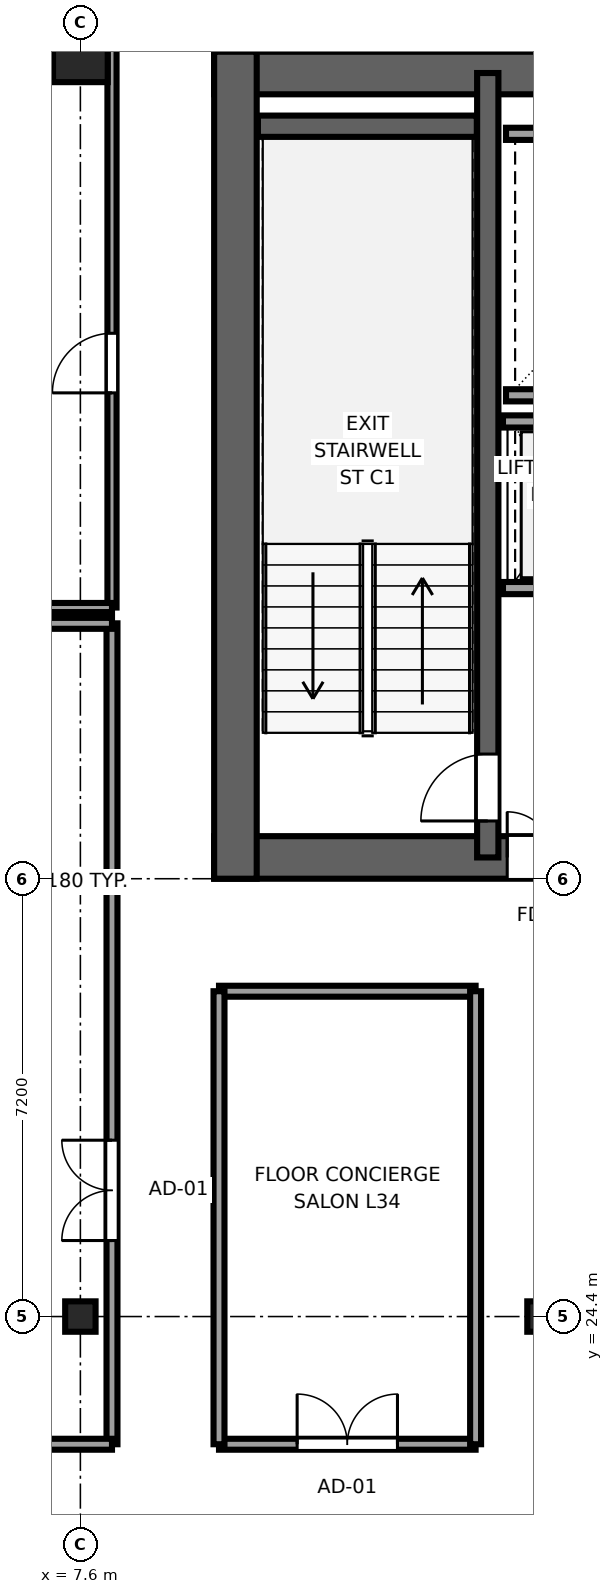
"""IFC4 building model, lengths in metres.
Left out: names, types, materials, properties, quantities, classifications, styles, units other than length and angle.
Written with IfcOpenShell. Run it as: python <this file> out.ifc"""

import sys

from ifc_helpers import new_model, si_unit, direction, frame, frame_2d, origin, origin_2d, place, context, subcontext, project, spatial, rectangle, i_section, extrude, source, transform, mapped, element, fill, save


model = new_model("IFC4")
c1 = context("Model", 3, precision=1e-05, world=origin(), true_north=direction((0.0, 1.0)))
c2 = subcontext(c1, "Body", "Model", "MODEL_VIEW")
j1 = project(units=[si_unit("LENGTHUNIT", "METRE"), si_unit("PLANEANGLEUNIT", "RADIAN")], contexts=[c1])
p1 = place(None, origin())
s1 = spatial("IfcSite", under=j1, at=p1, CompositionType="ELEMENT")
p2 = place(p1, origin())
s2 = spatial("IfcBuilding", under=s1, at=p2, CompositionType="ELEMENT")
p3 = place(p2, frame((0.0, 0.0, 132.85)))
s3 = spatial("IfcBuildingStorey", under=s2, at=p3, CompositionType="ELEMENT", Elevation=132.85)
p4 = place(p3, frame((9.8, 31.95, 0.0), z_axis=(0.0, 0.0, 1.0), x_axis=(1.0, 0.0, 0.0)))
e1 = element("IfcWall", 1, at=p4, inside=s3, PredefinedType="SHEAR", context=c2, shape_type="SweptSolid", body=[
    extrude(rectangle(XDim=26.4, YDim=0.7, at=frame_2d((13.2, 0.0))), origin(), (0.0, 0.0, 1.0), 3.55),
])
p5 = place(p4, frame((6.32, 0.0, 0.0), z_axis=(0.0, 0.0, 1.0), x_axis=(-1.0, 0.0, 0.0)))
e2 = element("IfcOpeningElement", 2, at=p5, cuts=e1, PredefinedType="OPENING", context=c2, shape_type="SweptSolid", body=[
    extrude(rectangle(XDim=1.5, YDim=2.04, at=frame_2d((0.75, 1.02))), frame((0.0, 0.36, 0.0), z_axis=(0.0, -1.0, 0.0), x_axis=(1.0, 0.0, 0.0)), (0.0, 0.0, 1.0), 0.72),
])
p6 = place(p4, frame((13.95, 0.0, 0.0), z_axis=(0.0, 0.0, 1.0), x_axis=(-1.0, 0.0, 0.0)))
e3 = element("IfcOpeningElement", 3, at=p6, cuts=e1, PredefinedType="OPENING", context=c2, shape_type="SweptSolid", body=[
    extrude(rectangle(XDim=1.5, YDim=2.04, at=frame_2d((0.75, 1.02))), frame((0.0, 0.36, 0.0), z_axis=(0.0, -1.0, 0.0), x_axis=(1.0, 0.0, 0.0)), (0.0, 0.0, 1.0), 0.72),
])
p7 = place(p4, frame((20.25, 0.0, 0.0), z_axis=(0.0, 0.0, 1.0), x_axis=(-1.0, 0.0, 0.0)))
e4 = element("IfcOpeningElement", 4, at=p7, cuts=e1, PredefinedType="OPENING", context=c2, shape_type="SweptSolid", body=[
    extrude(rectangle(XDim=1.5, YDim=2.04, at=frame_2d((0.75, 1.02))), frame((0.0, 0.36, 0.0), z_axis=(0.0, -1.0, 0.0), x_axis=(1.0, 0.0, 0.0)), (0.0, 0.0, 1.0), 0.72),
])
p8 = place(p4, frame((8.37, 0.0, 0.0), z_axis=(0.0, 0.0, 1.0), x_axis=(-1.0, 0.0, 0.0)))
e5 = element("IfcOpeningElement", 5, at=p8, cuts=e1, PredefinedType="OPENING", context=c2, shape_type="SweptSolid", body=[
    extrude(rectangle(XDim=0.82, YDim=2.01, at=frame_2d((0.41, 1.005))), frame((0.0, 0.36, 0.0), z_axis=(0.0, -1.0, 0.0), x_axis=(1.0, 0.0, 0.0)), (0.0, 0.0, 1.0), 0.72),
])
p9 = place(p3, frame((9.8, 44.85, 0.0), z_axis=(0.0, 0.0, 1.0), x_axis=(1.0, 0.0, 0.0)))
e6 = element("IfcWall", 6, at=p9, inside=s3, PredefinedType="SHEAR", context=c2, shape_type="SweptSolid", body=[
    extrude(rectangle(XDim=26.4, YDim=0.7, at=frame_2d((13.2, 0.0))), origin(), (0.0, 0.0, 1.0), 3.55),
])
p10 = place(p3, frame((10.15, 31.6, 0.0), z_axis=(0.0, 0.0, 1.0), x_axis=(0.0, 1.0, 0.0)))
e7 = element("IfcWall", 7, at=p10, inside=s3, PredefinedType="SHEAR", context=c2, shape_type="SweptSolid", body=[
    extrude(rectangle(XDim=13.6, YDim=0.7, at=frame_2d((6.8, 0.0))), origin(), (0.0, 0.0, 1.0), 3.55),
])
p11 = place(p3, frame((14.3, 31.95, 0.0), z_axis=(0.0, 0.0, 1.0), x_axis=(0.0, 1.0, 0.0)))
e8 = element("IfcWall", 8, at=p11, inside=s3, PredefinedType="SHEAR", context=c2, shape_type="SweptSolid", body=[
    extrude(rectangle(XDim=12.9, YDim=0.35, at=frame_2d((6.45, 0.0))), origin(), (0.0, 0.0, 1.0), 3.55),
])
p12 = place(p11, frame((0.6, 0.0, 0.0)))
e9 = element("IfcOpeningElement", 9, at=p12, cuts=e8, PredefinedType="OPENING", context=c2, shape_type="SweptSolid", body=[
    extrude(rectangle(XDim=1.1, YDim=2.12, at=frame_2d((0.55, 1.06))), frame((0.0, 0.185, 0.0), z_axis=(0.0, -1.0, 0.0), x_axis=(1.0, 0.0, 0.0)), (0.0, 0.0, 1.0), 0.37),
])
p13 = place(p3, frame((10.52, 43.975, 0.0), z_axis=(0.0, 0.0, 1.0), x_axis=(1.0, 0.0, 0.0)))
e10 = element("IfcWall", 10, at=p13, inside=s3, PredefinedType="SHEAR", context=c2, shape_type="SweptSolid", body=[
    extrude(rectangle(XDim=3.6, YDim=0.35, at=frame_2d((1.8, 0.0))), origin(), (0.0, 0.0, 1.0), 3.55),
])
m1 = source(origin(), c2, "Body", "SweptSolid", [
    extrude(i_section(OverallWidth=0.5, OverallDepth=0.5, WebThickness=0.022, FlangeThickness=0.034, at=origin_2d()), origin(), (0.0, 0.0, 1.0), 3.55),
])
for number, where, z_axis, x_axis in (
    (11, (7.6, 24.4, 0.0), (0.0, 0.0, 1.0), (1.0, 0.0, 0.0)),
    (12, (15.2, 24.4, 0.0), (0.0, 0.0, 1.0), (1.0, 0.0, 0.0)),
):
    element("IfcColumn", number, at=place(p3, frame(where, z_axis=z_axis, x_axis=x_axis)), inside=s3, PredefinedType="COLUMN", context=c2, shape_type="MappedRepresentation", body=[
        mapped(m1, transform((0.0, 0.0, 0.0), x_axis=(1.0, 0.0, 0.0), y_axis=(0.0, 1.0, 0.0), z_axis=(0.0, 0.0, 1.0), scale=1.0)),
    ])
m2 = source(origin(), c2, "Body", "SweptSolid", [
    extrude(rectangle(XDim=0.9, YDim=0.9, at=origin_2d()), origin(), (0.0, 0.0, 1.0), 3.55),
])
p14 = place(p3, frame((7.6, 45.15, 0.0), z_axis=(0.0, 0.0, 1.0), x_axis=(1.0, 0.0, 0.0)))
e13 = element("IfcColumn", 13, at=p14, inside=s3, PredefinedType="COLUMN", context=c2, shape_type="MappedRepresentation", body=[
    mapped(m2, transform((0.0, 0.0, 0.0), x_axis=(1.0, 0.0, 0.0), y_axis=(0.0, 1.0, 0.0), z_axis=(0.0, 0.0, 1.0), scale=1.0)),
])
for number, where, z_axis, x_axis in (
    (14, (14.6, 39.55, 0.0), (0.0, 0.0, 1.0), (1.0, 0.0, 0.0)),
    (15, (14.6, 43.85, 0.0), (0.0, 0.0, 1.0), (1.0, 0.0, 0.0)),
):
    element("IfcWall", number, at=place(p3, frame(where, z_axis=z_axis, x_axis=x_axis)), inside=s3, PredefinedType="SOLIDWALL", context=c2, shape_type="SweptSolid", body=[
        extrude(rectangle(XDim=4.1, YDim=0.2, at=frame_2d((2.05, 0.0))), origin(), (0.0, 0.0, 1.0), 3.37),
    ])
p15 = place(p3, frame((14.55, 36.38, 0.0), z_axis=(0.0, 0.0, 1.0), x_axis=(1.0, 0.0, 0.0)))
e16 = element("IfcWall", 16, at=p15, inside=s3, PredefinedType="SOLIDWALL", context=c2, shape_type="SweptSolid", body=[
    extrude(rectangle(XDim=4.075, YDim=0.2, at=frame_2d((2.038, 0.0))), origin(), (0.0, 0.0, 1.0), 3.37),
])
p16 = place(p15, frame((0.55, 0.0, 0.0)))
e17 = element("IfcOpeningElement", 17, at=p16, cuts=e16, PredefinedType="OPENING", context=c2, shape_type="SweptSolid", body=[
    extrude(rectangle(XDim=1.1, YDim=2.12, at=frame_2d((0.55, 1.06))), frame((0.0, 0.11, 0.0), z_axis=(0.0, -1.0, 0.0), x_axis=(1.0, 0.0, 0.0)), (0.0, 0.0, 1.0), 0.22),
])
p17 = place(p15, frame((2.45, 0.0, 0.0)))
e18 = element("IfcOpeningElement", 18, at=p17, cuts=e16, PredefinedType="OPENING", context=c2, shape_type="SweptSolid", body=[
    extrude(rectangle(XDim=1.1, YDim=2.12, at=frame_2d((0.55, 1.06))), frame((0.0, 0.11, 0.0), z_axis=(0.0, -1.0, 0.0), x_axis=(1.0, 0.0, 0.0)), (0.0, 0.0, 1.0), 0.22),
])
p18 = place(p3, frame((14.55, 39.12, 0.0), z_axis=(0.0, 0.0, 1.0), x_axis=(1.0, 0.0, 0.0)))
e19 = element("IfcWall", 19, at=p18, inside=s3, PredefinedType="SOLIDWALL", context=c2, shape_type="SweptSolid", body=[
    extrude(rectangle(XDim=4.075, YDim=0.2, at=frame_2d((2.038, 0.0))), origin(), (0.0, 0.0, 1.0), 3.37),
])
p19 = place(p3, frame((8.12, 22.3, 0.0), z_axis=(0.0, 0.0, 1.0), x_axis=(0.0, 1.0, 0.0)))
e20 = element("IfcWall", 20, at=p19, inside=s3, PredefinedType="PARTITIONING", context=c2, shape_type="SweptSolid", body=[
    extrude(rectangle(XDim=13.5, YDim=0.18, at=frame_2d((6.75, 0.0))), origin(), (0.0, 0.0, 1.0), 3.37),
])
p20 = place(p19, frame((3.35, 0.0, 0.0)))
e21 = element("IfcOpeningElement", 21, at=p20, cuts=e20, PredefinedType="OPENING", context=c2, shape_type="SweptSolid", body=[
    extrude(rectangle(XDim=1.65, YDim=2.15, at=frame_2d((0.825, 1.075))), frame((0.0, 0.1, 0.0), z_axis=(0.0, -1.0, 0.0), x_axis=(1.0, 0.0, 0.0)), (0.0, 0.0, 1.0), 0.2),
])
for number, where, z_axis, x_axis in (
    (22, (0.405, 22.3, 0.0), (0.0, 0.0, 1.0), (1.0, 0.0, 0.0)),
    (23, (0.405, 35.8, 0.0), (0.0, 0.0, 1.0), (1.0, 0.0, 0.0)),
):
    element("IfcWall", number, at=place(p3, frame(where, z_axis=z_axis, x_axis=x_axis)), inside=s3, PredefinedType="PARTITIONING", context=c2, shape_type="SweptSolid", body=[
        extrude(rectangle(XDim=7.715, YDim=0.18, at=frame_2d((3.857, 0.0))), origin(), (0.0, 0.0, 1.0), 3.37),
    ])
p21 = place(p3, frame((8.12, 36.06, 0.0), z_axis=(0.0, 0.0, 1.0), x_axis=(0.0, 1.0, 0.0)))
e24 = element("IfcWall", 24, at=p21, inside=s3, PredefinedType="PARTITIONING", context=c2, shape_type="SweptSolid", body=[
    extrude(rectangle(XDim=9.535, YDim=0.15, at=frame_2d((4.768, 0.0))), origin(), (0.0, 0.0, 1.0), 3.37),
])
p22 = place(p21, frame((3.53, 0.0, 0.0)))
e25 = element("IfcOpeningElement", 25, at=p22, cuts=e24, PredefinedType="OPENING", context=c2, shape_type="SweptSolid", body=[
    extrude(rectangle(XDim=0.98, YDim=2.12, at=frame_2d((0.49, 1.06))), frame((0.0, 0.085, 0.0), z_axis=(0.0, -1.0, 0.0), x_axis=(1.0, 0.0, 0.0)), (0.0, 0.0, 1.0), 0.17),
])
p23 = place(p3, frame((2.77, 36.06, 0.0), z_axis=(0.0, 0.0, 1.0), x_axis=(1.0, 0.0, 0.0)))
e26 = element("IfcWall", 26, at=p23, inside=s3, PredefinedType="PARTITIONING", context=c2, shape_type="SweptSolid", body=[
    extrude(rectangle(XDim=5.35, YDim=0.15, at=frame_2d((2.675, 0.0))), origin(), (0.0, 0.0, 1.0), 3.37),
])
p24 = place(p3, frame((9.88, 22.3, 0.0), z_axis=(0.0, 0.0, 1.0), x_axis=(1.0, 0.0, 0.0)))
e27 = element("IfcWall", 27, at=p24, inside=s3, PredefinedType="PARTITIONING", context=c2, shape_type="SweptSolid", body=[
    extrude(rectangle(XDim=4.22, YDim=0.18, at=frame_2d((2.11, 0.0))), origin(), (0.0, 0.0, 1.0), 3.37),
])
p25 = place(p24, frame((1.285, 0.0, 0.0)))
e28 = element("IfcOpeningElement", 28, at=p25, cuts=e27, PredefinedType="OPENING", context=c2, shape_type="SweptSolid", body=[
    extrude(rectangle(XDim=1.65, YDim=2.15, at=frame_2d((0.825, 1.075))), frame((0.0, 0.1, 0.0), z_axis=(0.0, -1.0, 0.0), x_axis=(1.0, 0.0, 0.0)), (0.0, 0.0, 1.0), 0.2),
])
p26 = place(p3, frame((9.88, 29.75, 0.0), z_axis=(0.0, 0.0, 1.0), x_axis=(1.0, 0.0, 0.0)))
e29 = element("IfcWall", 29, at=p26, inside=s3, PredefinedType="PARTITIONING", context=c2, shape_type="SweptSolid", body=[
    extrude(rectangle(XDim=4.22, YDim=0.18, at=frame_2d((2.11, 0.0))), origin(), (0.0, 0.0, 1.0), 3.37),
])
for number, where, z_axis, x_axis in (
    (30, (9.88, 22.3, 0.0), (0.0, 0.0, 1.0), (0.0, 1.0, 0.0)),
    (31, (14.1, 22.3, 0.0), (0.0, 0.0, 1.0), (0.0, 1.0, 0.0)),
):
    element("IfcWall", number, at=place(p3, frame(where, z_axis=z_axis, x_axis=x_axis)), inside=s3, PredefinedType="PARTITIONING", context=c2, shape_type="SweptSolid", body=[
        extrude(rectangle(XDim=7.45, YDim=0.18, at=frame_2d((3.725, 0.0))), origin(), (0.0, 0.0, 1.0), 3.37),
    ])
m3 = source(origin(), c2, "Body", "SweptSolid", [
    extrude(rectangle(XDim=1.1, YDim=2.12, at=frame_2d((0.55, 1.06))), frame((0.0, 0.025, 0.0), z_axis=(0.0, -1.0, 0.0), x_axis=(1.0, 0.0, 0.0)), (0.0, 0.0, 1.0), 0.05),
])
p27 = place(p12, origin())
e32 = element("IfcDoor", 32, at=p27, inside=s3, OperationType="SINGLE_SWING_LEFT", PredefinedType="DOOR", context=c2, shape_type="MappedRepresentation", body=[
    mapped(m3, transform((0.0, 0.0, 0.0), x_axis=(1.0, 0.0, 0.0), y_axis=(0.0, 1.0, 0.0), z_axis=(0.0, 0.0, 1.0), scale=1.0)),
])
fill(e9, e32)
m4 = source(origin(), c2, "Body", "SweptSolid", [
    extrude(rectangle(XDim=1.5, YDim=2.04, at=frame_2d((0.75, 1.02))), frame((0.0, 0.025, 0.0), z_axis=(0.0, -1.0, 0.0), x_axis=(1.0, 0.0, 0.0)), (0.0, 0.0, 1.0), 0.05),
])
p28 = place(p5, origin())
e33 = element("IfcDoor", 33, at=p28, inside=s3, OperationType="DOUBLE_DOOR_SINGLE_SWING", PredefinedType="DOOR", context=c2, shape_type="MappedRepresentation", body=[
    mapped(m4, transform((0.0, 0.0, 0.0), x_axis=(1.0, 0.0, 0.0), y_axis=(0.0, 1.0, 0.0), z_axis=(0.0, 0.0, 1.0), scale=1.0)),
])
fill(e2, e33)
m5 = source(origin(), c2, "Body", "SweptSolid", [
    extrude(rectangle(XDim=1.65, YDim=2.15, at=frame_2d((0.825, 1.075))), frame((0.0, 0.025, 0.0), z_axis=(0.0, -1.0, 0.0), x_axis=(1.0, 0.0, 0.0)), (0.0, 0.0, 1.0), 0.05),
])
p29 = place(p20, origin())
e34 = element("IfcDoor", 34, at=p29, inside=s3, OperationType="DOUBLE_DOOR_SINGLE_SWING", PredefinedType="DOOR", context=c2, shape_type="MappedRepresentation", body=[
    mapped(m5, transform((0.0, 0.0, 0.0), x_axis=(1.0, 0.0, 0.0), y_axis=(0.0, 1.0, 0.0), z_axis=(0.0, 0.0, 1.0), scale=1.0)),
])
fill(e21, e34)
m6 = source(origin(), c2, "Body", "SweptSolid", [
    extrude(rectangle(XDim=0.98, YDim=2.12, at=frame_2d((0.49, 1.06))), frame((0.0, 0.025, 0.0), z_axis=(0.0, -1.0, 0.0), x_axis=(1.0, 0.0, 0.0)), (0.0, 0.0, 1.0), 0.05),
])
p30 = place(p22, origin())
e35 = element("IfcDoor", 35, at=p30, inside=s3, OperationType="SINGLE_SWING_LEFT", PredefinedType="DOOR", context=c2, shape_type="MappedRepresentation", body=[
    mapped(m6, transform((0.0, 0.0, 0.0), x_axis=(1.0, 0.0, 0.0), y_axis=(0.0, 1.0, 0.0), z_axis=(0.0, 0.0, 1.0), scale=1.0)),
])
fill(e25, e35)
p31 = place(p25, origin())
e36 = element("IfcDoor", 36, at=p31, inside=s3, OperationType="DOUBLE_DOOR_SINGLE_SWING", PredefinedType="DOOR", context=c2, shape_type="MappedRepresentation", body=[
    mapped(m5, transform((0.0, 0.0, 0.0), x_axis=(1.0, 0.0, 0.0), y_axis=(0.0, 1.0, 0.0), z_axis=(0.0, 0.0, 1.0), scale=1.0)),
])
fill(e28, e36)
save(model, sys.argv[1])
